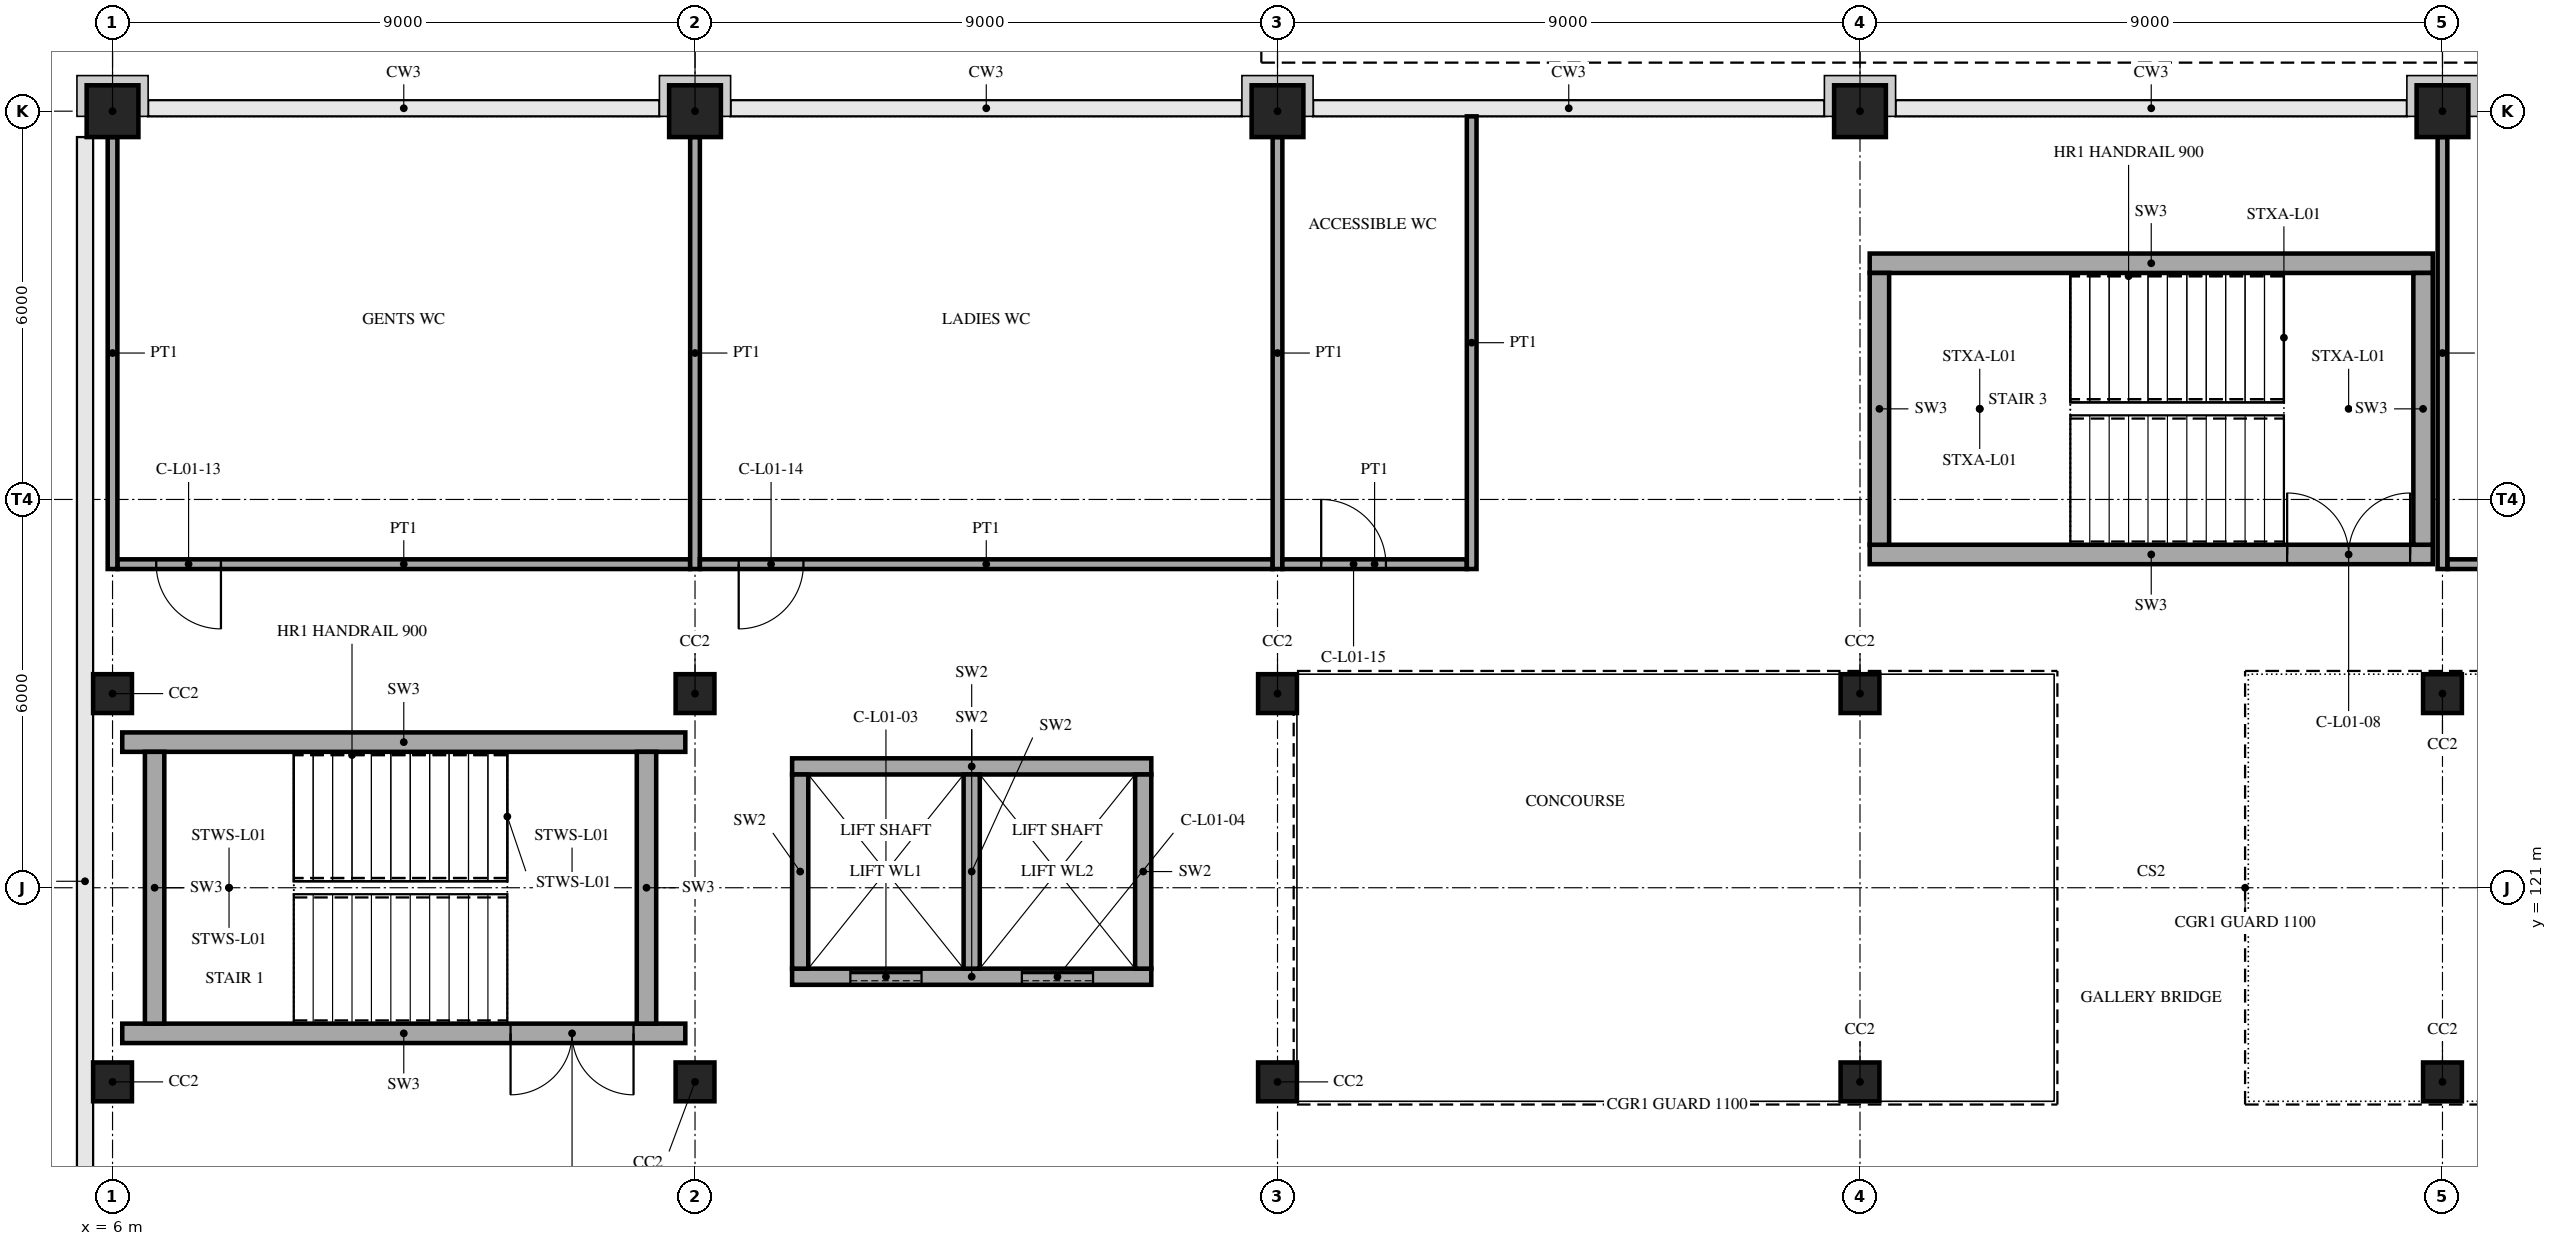
"""IFC4 building model, lengths in metres.
Left out: names, types, materials, properties, quantities, classifications, styles, units other than length and angle.
Written with IfcOpenShell. Run it as: python <this file> out.ifc"""

import sys

from ifc_helpers import new_model, si_unit, direction, frame, frame_2d, origin, origin_2d, place, context, subcontext, project, spatial, rectangle, extrude, element, fill, save


model = new_model("IFC4")
c1 = context("Model", 3, precision=1e-05, world=origin(), true_north=direction((0.0, 1.0)))
c2 = subcontext(c1, "Body", "Model", "MODEL_VIEW")
j1 = project(units=[si_unit("LENGTHUNIT", "METRE"), si_unit("PLANEANGLEUNIT", "RADIAN")], contexts=[c1])
p1 = place(None, origin())
s1 = spatial("IfcSite", under=j1, at=p1, CompositionType="ELEMENT")
p2 = place(p1, origin())
s2 = spatial("IfcBuilding", under=s1, at=p2, CompositionType="ELEMENT")
p3 = place(p2, frame((0.0, 0.0, 5.0)))
s3 = spatial("IfcBuildingStorey", under=s2, at=p3, CompositionType="ELEMENT", Elevation=5.0)
for number, where, z_axis, x_axis in (
    (1, (6.0, 118.0, 0.0), (0.0, 0.0, 1.0), (1.0, 0.0, 0.0)),
    (2, (6.0, 124.0, 0.0), (0.0, 0.0, 1.0), (1.0, 0.0, 0.0)),
):
    element("IfcColumn", number, at=place(p3, frame(where, z_axis=z_axis, x_axis=x_axis)), inside=s3, PredefinedType="COLUMN", context=c2, shape_type="SweptSolid", body=[
        extrude(rectangle(XDim=0.6, YDim=0.6, at=origin_2d()), origin(), (0.0, 0.0, 1.0), 5.0),
    ])
p4 = place(p3, frame((6.0, 133.0, 0.0), z_axis=(0.0, 0.0, 1.0), x_axis=(1.0, 0.0, 0.0)))
e3 = element("IfcColumn", 3, at=p4, inside=s3, PredefinedType="COLUMN", context=c2, shape_type="SweptSolid", body=[
    extrude(rectangle(XDim=0.8, YDim=0.8, at=origin_2d()), origin(), (0.0, 0.0, 1.0), 5.0),
])
for number, where, z_axis, x_axis in (
    (4, (15.0, 118.0, 0.0), (0.0, 0.0, 1.0), (1.0, 0.0, 0.0)),
    (5, (15.0, 124.0, 0.0), (0.0, 0.0, 1.0), (1.0, 0.0, 0.0)),
):
    element("IfcColumn", number, at=place(p3, frame(where, z_axis=z_axis, x_axis=x_axis)), inside=s3, PredefinedType="COLUMN", context=c2, shape_type="SweptSolid", body=[
        extrude(rectangle(XDim=0.6, YDim=0.6, at=origin_2d()), origin(), (0.0, 0.0, 1.0), 5.0),
    ])
p5 = place(p3, frame((15.0, 133.0, 0.0), z_axis=(0.0, 0.0, 1.0), x_axis=(1.0, 0.0, 0.0)))
e6 = element("IfcColumn", 6, at=p5, inside=s3, PredefinedType="COLUMN", context=c2, shape_type="SweptSolid", body=[
    extrude(rectangle(XDim=0.8, YDim=0.8, at=origin_2d()), origin(), (0.0, 0.0, 1.0), 5.0),
])
for number, where, z_axis, x_axis in (
    (7, (24.0, 118.0, 0.0), (0.0, 0.0, 1.0), (1.0, 0.0, 0.0)),
    (8, (24.0, 124.0, 0.0), (0.0, 0.0, 1.0), (1.0, 0.0, 0.0)),
):
    element("IfcColumn", number, at=place(p3, frame(where, z_axis=z_axis, x_axis=x_axis)), inside=s3, PredefinedType="COLUMN", context=c2, shape_type="SweptSolid", body=[
        extrude(rectangle(XDim=0.6, YDim=0.6, at=origin_2d()), origin(), (0.0, 0.0, 1.0), 5.0),
    ])
p6 = place(p3, frame((24.0, 133.0, 0.0), z_axis=(0.0, 0.0, 1.0), x_axis=(1.0, 0.0, 0.0)))
e9 = element("IfcColumn", 9, at=p6, inside=s3, PredefinedType="COLUMN", context=c2, shape_type="SweptSolid", body=[
    extrude(rectangle(XDim=0.8, YDim=0.8, at=origin_2d()), origin(), (0.0, 0.0, 1.0), 5.0),
])
for number, where, z_axis, x_axis in (
    (10, (33.0, 118.0, 0.0), (0.0, 0.0, 1.0), (1.0, 0.0, 0.0)),
    (11, (33.0, 124.0, 0.0), (0.0, 0.0, 1.0), (1.0, 0.0, 0.0)),
):
    element("IfcColumn", number, at=place(p3, frame(where, z_axis=z_axis, x_axis=x_axis)), inside=s3, PredefinedType="COLUMN", context=c2, shape_type="SweptSolid", body=[
        extrude(rectangle(XDim=0.6, YDim=0.6, at=origin_2d()), origin(), (0.0, 0.0, 1.0), 5.0),
    ])
p7 = place(p3, frame((33.0, 133.0, 0.0), z_axis=(0.0, 0.0, 1.0), x_axis=(1.0, 0.0, 0.0)))
e12 = element("IfcColumn", 12, at=p7, inside=s3, PredefinedType="COLUMN", context=c2, shape_type="SweptSolid", body=[
    extrude(rectangle(XDim=0.8, YDim=0.8, at=origin_2d()), origin(), (0.0, 0.0, 1.0), 5.0),
])
for number, where, z_axis, x_axis in (
    (13, (42.0, 118.0, 0.0), (0.0, 0.0, 1.0), (1.0, 0.0, 0.0)),
    (14, (42.0, 124.0, 0.0), (0.0, 0.0, 1.0), (1.0, 0.0, 0.0)),
):
    element("IfcColumn", number, at=place(p3, frame(where, z_axis=z_axis, x_axis=x_axis)), inside=s3, PredefinedType="COLUMN", context=c2, shape_type="SweptSolid", body=[
        extrude(rectangle(XDim=0.6, YDim=0.6, at=origin_2d()), origin(), (0.0, 0.0, 1.0), 5.0),
    ])
p8 = place(p3, frame((42.0, 133.0, 0.0), z_axis=(0.0, 0.0, 1.0), x_axis=(1.0, 0.0, 0.0)))
e15 = element("IfcColumn", 15, at=p8, inside=s3, PredefinedType="COLUMN", context=c2, shape_type="SweptSolid", body=[
    extrude(rectangle(XDim=0.8, YDim=0.8, at=origin_2d()), origin(), (0.0, 0.0, 1.0), 5.0),
])
p9 = place(p3, frame((6.15, 118.75, 0.0), z_axis=(0.0, 0.0, 1.0), x_axis=(1.0, 0.0, 0.0)))
e16 = element("IfcWall", 16, at=p9, inside=s3, PredefinedType="SHEAR", context=c2, shape_type="SweptSolid", body=[
    extrude(rectangle(XDim=8.7, YDim=0.3, at=frame_2d((4.35, 0.0))), origin(), (0.0, 0.0, 1.0), 5.0),
])
p10 = place(p9, frame((6.0, 0.0, 0.0)))
e17 = element("IfcOpeningElement", 17, at=p10, cuts=e16, PredefinedType="OPENING", context=c2, shape_type="SweptSolid", body=[
    extrude(rectangle(XDim=1.9, YDim=2.1, at=frame_2d((0.95, 1.05))), frame((0.0, 0.16, 0.0), z_axis=(0.0, -1.0, 0.0), x_axis=(1.0, 0.0, 0.0)), (0.0, 0.0, 1.0), 0.32),
])
p11 = place(p3, frame((6.15, 123.25, 0.0), z_axis=(0.0, 0.0, 1.0), x_axis=(1.0, 0.0, 0.0)))
e18 = element("IfcWall", 18, at=p11, inside=s3, PredefinedType="SHEAR", context=c2, shape_type="SweptSolid", body=[
    extrude(rectangle(XDim=8.7, YDim=0.3, at=frame_2d((4.35, 0.0))), origin(), (0.0, 0.0, 1.0), 5.0),
])
for number, where, z_axis, x_axis in (
    (19, (6.65, 118.9, 0.0), (0.0, 0.0, 1.0), (0.0, 1.0, 0.0)),
    (20, (14.25, 118.9, 0.0), (0.0, 0.0, 1.0), (0.0, 1.0, 0.0)),
):
    element("IfcWall", number, at=place(p3, frame(where, z_axis=z_axis, x_axis=x_axis)), inside=s3, PredefinedType="SHEAR", context=c2, shape_type="SweptSolid", body=[
        extrude(rectangle(XDim=4.2, YDim=0.3, at=frame_2d((2.1, 0.0))), origin(), (0.0, 0.0, 1.0), 5.0),
    ])
p12 = place(p3, frame((16.5, 119.625, 0.0), z_axis=(0.0, 0.0, 1.0), x_axis=(1.0, 0.0, 0.0)))
e21 = element("IfcWall", 21, at=p12, inside=s3, PredefinedType="SHEAR", context=c2, shape_type="SweptSolid", body=[
    extrude(rectangle(XDim=5.55, YDim=0.25, at=frame_2d((2.775, 0.0))), origin(), (0.0, 0.0, 1.0), 5.0),
])
p13 = place(p12, frame((0.9, 0.0, 0.0)))
e22 = element("IfcOpeningElement", 22, at=p13, cuts=e21, PredefinedType="OPENING", context=c2, shape_type="SweptSolid", body=[
    extrude(rectangle(XDim=1.1, YDim=2.1, at=frame_2d((0.55, 1.05))), frame((0.0, 0.135, 0.0), z_axis=(0.0, -1.0, 0.0), x_axis=(1.0, 0.0, 0.0)), (0.0, 0.0, 1.0), 0.27),
])
p14 = place(p12, frame((3.55, 0.0, 0.0)))
e23 = element("IfcOpeningElement", 23, at=p14, cuts=e21, PredefinedType="OPENING", context=c2, shape_type="SweptSolid", body=[
    extrude(rectangle(XDim=1.1, YDim=2.1, at=frame_2d((0.55, 1.05))), frame((0.0, 0.135, 0.0), z_axis=(0.0, -1.0, 0.0), x_axis=(1.0, 0.0, 0.0)), (0.0, 0.0, 1.0), 0.27),
])
p15 = place(p3, frame((16.5, 122.875, 0.0), z_axis=(0.0, 0.0, 1.0), x_axis=(1.0, 0.0, 0.0)))
e24 = element("IfcWall", 24, at=p15, inside=s3, PredefinedType="SHEAR", context=c2, shape_type="SweptSolid", body=[
    extrude(rectangle(XDim=5.55, YDim=0.25, at=frame_2d((2.775, 0.0))), origin(), (0.0, 0.0, 1.0), 5.0),
])
for number, where, z_axis, x_axis in (
    (25, (16.625, 119.75, 0.0), (0.0, 0.0, 1.0), (0.0, 1.0, 0.0)),
    (26, (21.925, 119.75, 0.0), (0.0, 0.0, 1.0), (0.0, 1.0, 0.0)),
    (27, (19.275, 119.75, 0.0), (0.0, 0.0, 1.0), (0.0, 1.0, 0.0)),
):
    element("IfcWall", number, at=place(p3, frame(where, z_axis=z_axis, x_axis=x_axis)), inside=s3, PredefinedType="SHEAR", context=c2, shape_type="SweptSolid", body=[
        extrude(rectangle(XDim=3.0, YDim=0.25, at=frame_2d((1.5, 0.0))), origin(), (0.0, 0.0, 1.0), 5.0),
    ])
p16 = place(p3, frame((33.15, 126.15, 0.0), z_axis=(0.0, 0.0, 1.0), x_axis=(1.0, 0.0, 0.0)))
e28 = element("IfcWall", 28, at=p16, inside=s3, PredefinedType="SHEAR", context=c2, shape_type="SweptSolid", body=[
    extrude(rectangle(XDim=8.7, YDim=0.3, at=frame_2d((4.35, 0.0))), origin(), (0.0, 0.0, 1.0), 5.0),
])
p17 = place(p16, frame((6.45, 0.0, 0.0)))
e29 = element("IfcOpeningElement", 29, at=p17, cuts=e28, PredefinedType="OPENING", context=c2, shape_type="SweptSolid", body=[
    extrude(rectangle(XDim=1.9, YDim=2.1, at=frame_2d((0.95, 1.05))), frame((0.0, 0.16, 0.0), z_axis=(0.0, -1.0, 0.0), x_axis=(1.0, 0.0, 0.0)), (0.0, 0.0, 1.0), 0.32),
])
p18 = place(p3, frame((33.15, 130.65, 0.0), z_axis=(0.0, 0.0, 1.0), x_axis=(1.0, 0.0, 0.0)))
e30 = element("IfcWall", 30, at=p18, inside=s3, PredefinedType="SHEAR", context=c2, shape_type="SweptSolid", body=[
    extrude(rectangle(XDim=8.7, YDim=0.3, at=frame_2d((4.35, 0.0))), origin(), (0.0, 0.0, 1.0), 5.0),
])
for number, where, z_axis, x_axis in (
    (31, (33.3, 126.3, 0.0), (0.0, 0.0, 1.0), (0.0, 1.0, 0.0)),
    (32, (41.7, 126.3, 0.0), (0.0, 0.0, 1.0), (0.0, 1.0, 0.0)),
):
    element("IfcWall", number, at=place(p3, frame(where, z_axis=z_axis, x_axis=x_axis)), inside=s3, PredefinedType="SHEAR", context=c2, shape_type="SweptSolid", body=[
        extrude(rectangle(XDim=4.2, YDim=0.3, at=frame_2d((2.1, 0.0))), origin(), (0.0, 0.0, 1.0), 5.0),
    ])
p19 = place(p3, frame((6.075, 126.0, 0.0), z_axis=(0.0, 0.0, 1.0), x_axis=(1.0, 0.0, 0.0)))
e33 = element("IfcWall", 33, at=p19, inside=s3, PredefinedType="PARTITIONING", context=c2, shape_type="SweptSolid", body=[
    extrude(rectangle(XDim=8.85, YDim=0.15, at=frame_2d((4.425, 0.0))), origin(), (0.0, 0.0, 1.0), 4.8),
])
p20 = place(p19, frame((0.6, 0.0, 0.0)))
e34 = element("IfcOpeningElement", 34, at=p20, cuts=e33, PredefinedType="OPENING", context=c2, shape_type="SweptSolid", body=[
    extrude(rectangle(XDim=1.0, YDim=2.1, at=frame_2d((0.5, 1.05))), frame((0.0, 0.085, 0.0), z_axis=(0.0, -1.0, 0.0), x_axis=(1.0, 0.0, 0.0)), (0.0, 0.0, 1.0), 0.17),
])
for number, where, z_axis, x_axis in (
    (35, (6.0, 125.925, 0.0), (0.0, 0.0, 1.0), (0.0, 1.0, 0.0)),
    (36, (15.0, 125.925, 0.0), (0.0, 0.0, 1.0), (0.0, 1.0, 0.0)),
):
    element("IfcWall", number, at=place(p3, frame(where, z_axis=z_axis, x_axis=x_axis)), inside=s3, PredefinedType="PARTITIONING", context=c2, shape_type="SweptSolid", body=[
        extrude(rectangle(XDim=6.675, YDim=0.15, at=frame_2d((3.337, 0.0))), origin(), (0.0, 0.0, 1.0), 4.0),
    ])
p21 = place(p3, frame((15.075, 126.0, 0.0), z_axis=(0.0, 0.0, 1.0), x_axis=(1.0, 0.0, 0.0)))
e37 = element("IfcWall", 37, at=p21, inside=s3, PredefinedType="PARTITIONING", context=c2, shape_type="SweptSolid", body=[
    extrude(rectangle(XDim=8.85, YDim=0.15, at=frame_2d((4.425, 0.0))), origin(), (0.0, 0.0, 1.0), 4.8),
])
p22 = place(p21, frame((0.6, 0.0, 0.0)))
e38 = element("IfcOpeningElement", 38, at=p22, cuts=e37, PredefinedType="OPENING", context=c2, shape_type="SweptSolid", body=[
    extrude(rectangle(XDim=1.0, YDim=2.1, at=frame_2d((0.5, 1.05))), frame((0.0, 0.085, 0.0), z_axis=(0.0, -1.0, 0.0), x_axis=(1.0, 0.0, 0.0)), (0.0, 0.0, 1.0), 0.17),
])
p23 = place(p3, frame((24.0, 125.925, 0.0), z_axis=(0.0, 0.0, 1.0), x_axis=(0.0, 1.0, 0.0)))
e39 = element("IfcWall", 39, at=p23, inside=s3, PredefinedType="PARTITIONING", context=c2, shape_type="SweptSolid", body=[
    extrude(rectangle(XDim=6.675, YDim=0.15, at=frame_2d((3.337, 0.0))), origin(), (0.0, 0.0, 1.0), 4.0),
])
p24 = place(p3, frame((24.075, 126.0, 0.0), z_axis=(0.0, 0.0, 1.0), x_axis=(1.0, 0.0, 0.0)))
e40 = element("IfcWall", 40, at=p24, inside=s3, PredefinedType="PARTITIONING", context=c2, shape_type="SweptSolid", body=[
    extrude(rectangle(XDim=2.85, YDim=0.15, at=frame_2d((1.425, 0.0))), origin(), (0.0, 0.0, 1.0), 4.8),
])
p25 = place(p24, frame((0.6, 0.0, 0.0)))
e41 = element("IfcOpeningElement", 41, at=p25, cuts=e40, PredefinedType="OPENING", context=c2, shape_type="SweptSolid", body=[
    extrude(rectangle(XDim=1.0, YDim=2.1, at=frame_2d((0.5, 1.05))), frame((0.0, 0.085, 0.0), z_axis=(0.0, -1.0, 0.0), x_axis=(1.0, 0.0, 0.0)), (0.0, 0.0, 1.0), 0.17),
])
p26 = place(p3, frame((27.0, 125.925, 0.0), z_axis=(0.0, 0.0, 1.0), x_axis=(0.0, 1.0, 0.0)))
e42 = element("IfcWall", 42, at=p26, inside=s3, PredefinedType="PARTITIONING", context=c2, shape_type="SweptSolid", body=[
    extrude(rectangle(XDim=6.995, YDim=0.15, at=frame_2d((3.498, 0.0))), origin(), (0.0, 0.0, 1.0), 4.8),
])
p27 = place(p3, frame((42.075, 126.0, 0.0), z_axis=(0.0, 0.0, 1.0), x_axis=(1.0, 0.0, 0.0)))
e43 = element("IfcWall", 43, at=p27, inside=s3, PredefinedType="PARTITIONING", context=c2, shape_type="SweptSolid", body=[
    extrude(rectangle(XDim=8.85, YDim=0.15, at=frame_2d((4.425, 0.0))), origin(), (0.0, 0.0, 1.0), 4.8),
])
p28 = place(p27, frame((0.6, 0.0, 0.0)))
e44 = element("IfcOpeningElement", 44, at=p28, cuts=e43, PredefinedType="OPENING", context=c2, shape_type="SweptSolid", body=[
    extrude(rectangle(XDim=1.0, YDim=2.1, at=frame_2d((0.5, 1.05))), frame((0.0, 0.085, 0.0), z_axis=(0.0, -1.0, 0.0), x_axis=(1.0, 0.0, 0.0)), (0.0, 0.0, 1.0), 0.17),
])
p29 = place(p27, frame((2.2, 0.0, 0.9)))
e45 = element("IfcOpeningElement", 45, at=p29, cuts=e43, PredefinedType="OPENING", context=c2, shape_type="SweptSolid", body=[
    extrude(rectangle(XDim=2.4, YDim=1.5, at=frame_2d((1.2, 0.75))), frame((0.0, 0.085, 0.0), z_axis=(0.0, -1.0, 0.0), x_axis=(1.0, 0.0, 0.0)), (0.0, 0.0, 1.0), 0.17),
])
p30 = place(p27, frame((5.2, 0.0, 0.9)))
e46 = element("IfcOpeningElement", 46, at=p30, cuts=e43, PredefinedType="OPENING", context=c2, shape_type="SweptSolid", body=[
    extrude(rectangle(XDim=2.4, YDim=1.5, at=frame_2d((1.2, 0.75))), frame((0.0, 0.085, 0.0), z_axis=(0.0, -1.0, 0.0), x_axis=(1.0, 0.0, 0.0)), (0.0, 0.0, 1.0), 0.17),
])
p31 = place(p3, frame((42.0, 125.925, 0.0), z_axis=(0.0, 0.0, 1.0), x_axis=(0.0, 1.0, 0.0)))
e47 = element("IfcWall", 47, at=p31, inside=s3, PredefinedType="PARTITIONING", context=c2, shape_type="SweptSolid", body=[
    extrude(rectangle(XDim=6.675, YDim=0.15, at=frame_2d((3.337, 0.0))), origin(), (0.0, 0.0, 1.0), 4.0),
])
p32 = place(p10, frame((1.9, 0.0, 0.0), z_axis=(0.0, 0.0, 1.0), x_axis=(-1.0, 0.0, 0.0)))
e48 = element("IfcDoor", 48, at=p32, inside=s3, OperationType="DOUBLE_DOOR_SINGLE_SWING", PredefinedType="NOTDEFINED", context=c2, shape_type="SweptSolid", body=[
    extrude(rectangle(XDim=1.9, YDim=2.1, at=frame_2d((0.95, 1.05))), frame((0.0, 0.025, 0.0), z_axis=(0.0, -1.0, 0.0), x_axis=(1.0, 0.0, 0.0)), (0.0, 0.0, 1.0), 0.05),
])
fill(e17, e48)
p33 = place(p13, origin())
e49 = element("IfcDoor", 49, at=p33, inside=s3, OperationType="DOUBLE_DOOR_SLIDING", PredefinedType="NOTDEFINED", context=c2, shape_type="SweptSolid", body=[
    extrude(rectangle(XDim=1.1, YDim=2.1, at=frame_2d((0.55, 1.05))), frame((0.0, 0.025, 0.0), z_axis=(0.0, -1.0, 0.0), x_axis=(1.0, 0.0, 0.0)), (0.0, 0.0, 1.0), 0.05),
])
fill(e22, e49)
p34 = place(p14, origin())
e50 = element("IfcDoor", 50, at=p34, inside=s3, OperationType="DOUBLE_DOOR_SLIDING", PredefinedType="NOTDEFINED", context=c2, shape_type="SweptSolid", body=[
    extrude(rectangle(XDim=1.1, YDim=2.1, at=frame_2d((0.55, 1.05))), frame((0.0, 0.025, 0.0), z_axis=(0.0, -1.0, 0.0), x_axis=(1.0, 0.0, 0.0)), (0.0, 0.0, 1.0), 0.05),
])
fill(e23, e50)
p35 = place(p17, origin())
e51 = element("IfcDoor", 51, at=p35, inside=s3, OperationType="DOUBLE_DOOR_SINGLE_SWING", PredefinedType="NOTDEFINED", context=c2, shape_type="SweptSolid", body=[
    extrude(rectangle(XDim=1.9, YDim=2.1, at=frame_2d((0.95, 1.05))), frame((0.0, 0.025, 0.0), z_axis=(0.0, -1.0, 0.0), x_axis=(1.0, 0.0, 0.0)), (0.0, 0.0, 1.0), 0.05),
])
fill(e29, e51)
p36 = place(p20, frame((1.0, 0.0, 0.0), z_axis=(0.0, 0.0, 1.0), x_axis=(-1.0, 0.0, 0.0)))
e52 = element("IfcDoor", 52, at=p36, inside=s3, OperationType="SINGLE_SWING_LEFT", PredefinedType="NOTDEFINED", context=c2, shape_type="SweptSolid", body=[
    extrude(rectangle(XDim=1.0, YDim=2.1, at=frame_2d((0.5, 1.05))), frame((0.0, 0.025, 0.0), z_axis=(0.0, -1.0, 0.0), x_axis=(1.0, 0.0, 0.0)), (0.0, 0.0, 1.0), 0.05),
])
fill(e34, e52)
p37 = place(p22, frame((1.0, 0.0, 0.0), z_axis=(0.0, 0.0, 1.0), x_axis=(-1.0, 0.0, 0.0)))
e53 = element("IfcDoor", 53, at=p37, inside=s3, OperationType="SINGLE_SWING_RIGHT", PredefinedType="NOTDEFINED", context=c2, shape_type="SweptSolid", body=[
    extrude(rectangle(XDim=1.0, YDim=2.1, at=frame_2d((0.5, 1.05))), frame((0.0, 0.025, 0.0), z_axis=(0.0, -1.0, 0.0), x_axis=(1.0, 0.0, 0.0)), (0.0, 0.0, 1.0), 0.05),
])
fill(e38, e53)
p38 = place(p25, origin())
e54 = element("IfcDoor", 54, at=p38, inside=s3, OperationType="SINGLE_SWING_LEFT", PredefinedType="NOTDEFINED", context=c2, shape_type="SweptSolid", body=[
    extrude(rectangle(XDim=1.0, YDim=2.1, at=frame_2d((0.5, 1.05))), frame((0.0, 0.025, 0.0), z_axis=(0.0, -1.0, 0.0), x_axis=(1.0, 0.0, 0.0)), (0.0, 0.0, 1.0), 0.05),
])
fill(e41, e54)
save(model, sys.argv[1])
